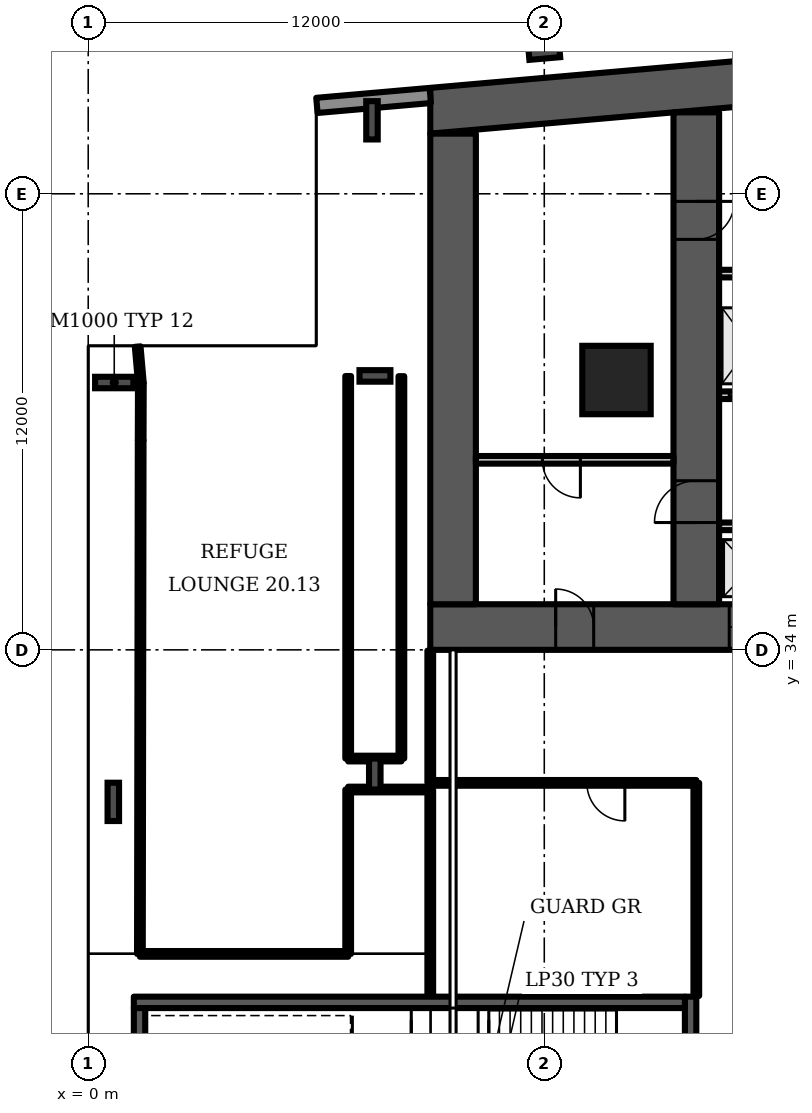
"""IFC4 building model, lengths in metres.
Left out: names, types, materials, properties, quantities, classifications, styles, units other than length and angle.
Written with IfcOpenShell. Run it as: python <this file> out.ifc"""

import sys

from ifc_helpers import new_model, si_unit, direction, frame, frame_2d, origin, origin_2d, place, context, subcontext, project, spatial, polyline, rectangle, i_section, outline, extrude, element, fill, save


model = new_model("IFC4")
c1 = context("Model", 3, precision=1e-05, world=origin(), true_north=direction((0.0, 1.0)))
c2 = subcontext(c1, "Body", "Model", "MODEL_VIEW")
j1 = project(units=[si_unit("LENGTHUNIT", "METRE"), si_unit("PLANEANGLEUNIT", "RADIAN")], contexts=[c1])
p1 = place(None, origin())
s1 = spatial("IfcSite", under=j1, at=p1, CompositionType="ELEMENT")
p2 = place(p1, origin())
s2 = spatial("IfcBuilding", under=s1, at=p2, CompositionType="ELEMENT")
p3 = place(p2, frame((0.0, 0.0, 91.9)))
s3 = spatial("IfcBuildingStorey", under=s2, at=p3, CompositionType="ELEMENT", Elevation=91.9)
p4 = place(p3, origin())
e1 = element("IfcWall", 1, at=p4, inside=s3, PredefinedType="SHEAR", context=c2, shape_type="SweptSolid", body=[
    extrude(outline(polyline([(9.0, 47.583), (37.0, 50.032), (65.0, 47.583), (65.0, 48.787), (37.0, 51.237), (9.0, 48.787), (9.0, 47.583)])), origin(), (0.0, 0.0, 1.0), 4.8),
])
p5 = place(p3, frame((9.0, 34.6, 0.0), z_axis=(0.0, 0.0, 1.0), x_axis=(1.0, 0.0, 0.0)))
e2 = element("IfcWall", 2, at=p5, inside=s3, PredefinedType="SHEAR", context=c2, shape_type="SweptSolid", body=[
    extrude(rectangle(XDim=56.0, YDim=1.2, at=frame_2d((28.0, 0.0))), origin(), (0.0, 0.0, 1.0), 4.8),
])
p6 = place(p5, frame((3.3, 0.0, 0.0)))
e3 = element("IfcOpeningElement", 3, at=p6, cuts=e2, PredefinedType="OPENING", context=c2, shape_type="SweptSolid", body=[
    extrude(rectangle(XDim=1.0, YDim=2.1, at=frame_2d((0.5, 1.05))), frame((0.0, 0.61, 0.0), z_axis=(0.0, -1.0, 0.0), x_axis=(1.0, 0.0, 0.0)), (0.0, 0.0, 1.0), 1.22),
])
p7 = place(p5, frame((7.867, 0.0, 0.0)))
e4 = element("IfcOpeningElement", 4, at=p7, cuts=e2, PredefinedType="OPENING", context=c2, shape_type="SweptSolid", body=[
    extrude(rectangle(XDim=1.1, YDim=2.1, at=frame_2d((0.55, 1.05))), frame((0.0, 0.61, 0.0), z_axis=(0.0, -1.0, 0.0), x_axis=(1.0, 0.0, 0.0)), (0.0, 0.0, 1.0), 1.22),
])
p8 = place(p5, frame((12.033, 0.0, 0.0)))
e5 = element("IfcOpeningElement", 5, at=p8, cuts=e2, PredefinedType="OPENING", context=c2, shape_type="SweptSolid", body=[
    extrude(rectangle(XDim=1.1, YDim=2.1, at=frame_2d((0.55, 1.05))), frame((0.0, 0.61, 0.0), z_axis=(0.0, -1.0, 0.0), x_axis=(1.0, 0.0, 0.0)), (0.0, 0.0, 1.0), 1.22),
])
p9 = place(p5, frame((9.8, 0.0, 0.0)))
e6 = element("IfcOpeningElement", 6, at=p9, cuts=e2, PredefinedType="OPENING", context=c2, shape_type="SweptSolid", body=[
    extrude(rectangle(XDim=1.4, YDim=2.1, at=frame_2d((0.7, 1.05))), frame((0.0, 0.61, 0.0), z_axis=(0.0, -1.0, 0.0), x_axis=(1.0, 0.0, 0.0)), (0.0, 0.0, 1.0), 1.22),
])
p10 = place(p5, frame((14.65, 0.0, 0.0)))
e7 = element("IfcOpeningElement", 7, at=p10, cuts=e2, PredefinedType="OPENING", context=c2, shape_type="SweptSolid", body=[
    extrude(rectangle(XDim=1.2, YDim=2.1, at=frame_2d((0.6, 1.05))), frame((0.0, 0.61, 0.0), z_axis=(0.0, -1.0, 0.0), x_axis=(1.0, 0.0, 0.0)), (0.0, 0.0, 1.0), 1.22),
])
p11 = place(p5, frame((21.867, 0.0, 0.0)))
e8 = element("IfcOpeningElement", 8, at=p11, cuts=e2, PredefinedType="OPENING", context=c2, shape_type="SweptSolid", body=[
    extrude(rectangle(XDim=1.1, YDim=2.1, at=frame_2d((0.55, 1.05))), frame((0.0, 0.61, 0.0), z_axis=(0.0, -1.0, 0.0), x_axis=(1.0, 0.0, 0.0)), (0.0, 0.0, 1.0), 1.22),
])
p12 = place(p5, frame((26.033, 0.0, 0.0)))
e9 = element("IfcOpeningElement", 9, at=p12, cuts=e2, PredefinedType="OPENING", context=c2, shape_type="SweptSolid", body=[
    extrude(rectangle(XDim=1.1, YDim=2.1, at=frame_2d((0.55, 1.05))), frame((0.0, 0.61, 0.0), z_axis=(0.0, -1.0, 0.0), x_axis=(1.0, 0.0, 0.0)), (0.0, 0.0, 1.0), 1.22),
])
p13 = place(p5, frame((23.8, 0.0, 0.0)))
e10 = element("IfcOpeningElement", 10, at=p13, cuts=e2, PredefinedType="OPENING", context=c2, shape_type="SweptSolid", body=[
    extrude(rectangle(XDim=1.4, YDim=2.1, at=frame_2d((0.7, 1.05))), frame((0.0, 0.61, 0.0), z_axis=(0.0, -1.0, 0.0), x_axis=(1.0, 0.0, 0.0)), (0.0, 0.0, 1.0), 1.22),
])
p14 = place(p5, frame((28.867, 0.0, 0.0)))
e11 = element("IfcOpeningElement", 11, at=p14, cuts=e2, PredefinedType="OPENING", context=c2, shape_type="SweptSolid", body=[
    extrude(rectangle(XDim=1.1, YDim=2.1, at=frame_2d((0.55, 1.05))), frame((0.0, 0.61, 0.0), z_axis=(0.0, -1.0, 0.0), x_axis=(1.0, 0.0, 0.0)), (0.0, 0.0, 1.0), 1.22),
])
p15 = place(p5, frame((33.033, 0.0, 0.0)))
e12 = element("IfcOpeningElement", 12, at=p15, cuts=e2, PredefinedType="OPENING", context=c2, shape_type="SweptSolid", body=[
    extrude(rectangle(XDim=1.1, YDim=2.1, at=frame_2d((0.55, 1.05))), frame((0.0, 0.61, 0.0), z_axis=(0.0, -1.0, 0.0), x_axis=(1.0, 0.0, 0.0)), (0.0, 0.0, 1.0), 1.22),
])
p16 = place(p5, frame((40.15, 0.0, 0.0)))
e13 = element("IfcOpeningElement", 13, at=p16, cuts=e2, PredefinedType="OPENING", context=c2, shape_type="SweptSolid", body=[
    extrude(rectangle(XDim=1.2, YDim=2.1, at=frame_2d((0.6, 1.05))), frame((0.0, 0.61, 0.0), z_axis=(0.0, -1.0, 0.0), x_axis=(1.0, 0.0, 0.0)), (0.0, 0.0, 1.0), 1.22),
])
p17 = place(p5, frame((44.8, 0.0, 0.0)))
e14 = element("IfcOpeningElement", 14, at=p17, cuts=e2, PredefinedType="OPENING", context=c2, shape_type="SweptSolid", body=[
    extrude(rectangle(XDim=1.4, YDim=2.1, at=frame_2d((0.7, 1.05))), frame((0.0, 0.61, 0.0), z_axis=(0.0, -1.0, 0.0), x_axis=(1.0, 0.0, 0.0)), (0.0, 0.0, 1.0), 1.22),
])
p18 = place(p5, frame((49.867, 0.0, 0.0)))
e15 = element("IfcOpeningElement", 15, at=p18, cuts=e2, PredefinedType="OPENING", context=c2, shape_type="SweptSolid", body=[
    extrude(rectangle(XDim=1.1, YDim=2.1, at=frame_2d((0.55, 1.05))), frame((0.0, 0.61, 0.0), z_axis=(0.0, -1.0, 0.0), x_axis=(1.0, 0.0, 0.0)), (0.0, 0.0, 1.0), 1.22),
])
p19 = place(p5, frame((53.5, 0.0, 0.0)))
e16 = element("IfcOpeningElement", 16, at=p19, cuts=e2, PredefinedType="OPENING", context=c2, shape_type="SweptSolid", body=[
    extrude(rectangle(XDim=1.1, YDim=2.1, at=frame_2d((0.55, 1.05))), frame((0.0, 0.61, 0.0), z_axis=(0.0, -1.0, 0.0), x_axis=(1.0, 0.0, 0.0)), (0.0, 0.0, 1.0), 1.22),
])
p20 = place(p5, frame((51.567, 0.0, 0.0)))
e17 = element("IfcOpeningElement", 17, at=p20, cuts=e2, PredefinedType="OPENING", context=c2, shape_type="SweptSolid", body=[
    extrude(rectangle(XDim=1.4, YDim=2.1, at=frame_2d((0.7, 1.05))), frame((0.0, 0.61, 0.0), z_axis=(0.0, -1.0, 0.0), x_axis=(1.0, 0.0, 0.0)), (0.0, 0.0, 1.0), 1.22),
])
p21 = place(p3, frame((9.6, 35.2, 0.0), z_axis=(0.0, 0.0, 1.0), x_axis=(0.0, 1.0, 0.0)))
e18 = element("IfcWall", 18, at=p21, inside=s3, PredefinedType="SHEAR", context=c2, shape_type="SweptSolid", body=[
    extrude(rectangle(XDim=12.383, YDim=1.2, at=frame_2d((6.191, 0.0))), origin(), (0.0, 0.0, 1.0), 4.8),
])
p22 = place(p3, frame((16.0, 35.2, 0.0), z_axis=(0.0, 0.0, 1.0), x_axis=(0.0, 1.0, 0.0)))
e19 = element("IfcWall", 19, at=p22, inside=s3, PredefinedType="SHEAR", context=c2, shape_type="SweptSolid", body=[
    extrude(rectangle(XDim=12.943, YDim=1.2, at=frame_2d((6.471, 0.0))), origin(), (0.0, 0.0, 1.0), 4.8),
])
p23 = place(p22, frame((2.15, 0.0, 0.0)))
e20 = element("IfcOpeningElement", 20, at=p23, cuts=e19, PredefinedType="OPENING", context=c2, shape_type="SweptSolid", body=[
    extrude(rectangle(XDim=1.1, YDim=2.1, at=frame_2d((0.55, 1.05))), frame((0.0, 0.61, 0.0), z_axis=(0.0, -1.0, 0.0), x_axis=(1.0, 0.0, 0.0)), (0.0, 0.0, 1.0), 1.22),
])
p24 = place(p22, frame((9.6, 0.0, 0.0)))
e21 = element("IfcOpeningElement", 21, at=p24, cuts=e19, PredefinedType="OPENING", context=c2, shape_type="SweptSolid", body=[
    extrude(rectangle(XDim=1.0, YDim=2.1, at=frame_2d((0.5, 1.05))), frame((0.0, 0.61, 0.0), z_axis=(0.0, -1.0, 0.0), x_axis=(1.0, 0.0, 0.0)), (0.0, 0.0, 1.0), 1.22),
])
p25 = place(p3, frame((13.9, 41.1, 0.0), z_axis=(0.0, 0.0, 1.0), x_axis=(1.0, 0.0, 0.0)))
e22 = element("IfcColumn", 22, at=p25, inside=s3, PredefinedType="COLUMN", context=c2, shape_type="SweptSolid", body=[
    extrude(rectangle(XDim=1.8, YDim=1.8, at=origin_2d()), origin(), (0.0, 0.0, 1.0), 4.8),
])
for number, where, z_axis, x_axis in (
    (23, (7.544, 41.208, 0.0), (0.0, 0.0, 1.0), (0.0, 1.0, 0.0)),
    (24, (7.54, 30.733, 0.0), (0.0, 0.0, 1.0), (-1.0, 0.0, 0.0)),
    (25, (12.0, 49.71, 0.0), (0.0, 0.0, 1.0), (-0.087, 0.996, 0.0)),
):
    element("IfcColumn", number, at=place(p3, frame(where, z_axis=z_axis, x_axis=x_axis)), inside=s3, PredefinedType="COLUMN", context=c2, shape_type="SweptSolid", body=[
        extrude(i_section(OverallWidth=0.303, OverallDepth=0.814, WebThickness=0.021, FlangeThickness=0.04, FilletRadius=0.03, at=origin_2d()), origin(), (0.0, 0.0, 1.0), 4.8),
    ])
for number, where, z_axis, x_axis in (
    (26, (7.467, 47.934, 0.0), (0.0, 0.0, 1.0), (-1.0, 0.0, 0.0)),
    (27, (0.685, 41.034, 0.0), (0.0, 0.0, 1.0), (0.0, 1.0, 0.0)),
    (28, (0.66, 30.0, 0.0), (0.0, 0.0, 1.0), (-1.0, 0.0, 0.0)),
):
    element("IfcColumn", number, at=place(p3, frame(where, z_axis=z_axis, x_axis=x_axis)), inside=s3, PredefinedType="COLUMN", context=c2, shape_type="SweptSolid", body=[
        extrude(i_section(OverallWidth=0.302, OverallDepth=1.008, WebThickness=0.021, FlangeThickness=0.04, FilletRadius=0.03, at=origin_2d()), origin(), (0.0, 0.0, 1.0), 4.8),
    ])
p26 = place(p3, frame((9.0, 48.587, 0.0), z_axis=(0.0, 0.0, 1.0), x_axis=(-0.996194, -0.087168, 0.0)))
e29 = element("IfcWall", 29, at=p26, inside=s3, PredefinedType="SOLIDWALL", context=c2, shape_type="SweptSolid", body=[
    extrude(rectangle(XDim=2.994, YDim=0.4, at=frame_2d((1.497, 0.0))), origin(), (0.0, 0.0, 1.0), 4.4),
])
p27 = place(p3, frame((10.2, 39.0, 0.0), z_axis=(0.0, 0.0, 1.0), x_axis=(1.0, 0.0, 0.0)))
e30 = element("IfcWall", 30, at=p27, inside=s3, PredefinedType="PARTITIONING", context=c2, shape_type="SweptSolid", body=[
    extrude(rectangle(XDim=5.2, YDim=0.2, at=frame_2d((2.6, 0.0))), origin(), (0.0, 0.0, 1.0), 4.4),
])
p28 = place(p27, frame((1.75, 0.0, 0.0)))
e31 = element("IfcOpeningElement", 31, at=p28, cuts=e30, PredefinedType="OPENING", context=c2, shape_type="SweptSolid", body=[
    extrude(rectangle(XDim=1.0, YDim=2.1, at=frame_2d((0.5, 1.05))), frame((0.0, 0.11, 0.0), z_axis=(0.0, -1.0, 0.0), x_axis=(1.0, 0.0, 0.0)), (0.0, 0.0, 1.0), 0.22),
])
p29 = place(p3, frame((16.6, 40.7, 0.0), z_axis=(0.0, 0.0, 1.0), x_axis=(1.0, 0.0, 0.0)))
e32 = element("IfcWall", 32, at=p29, inside=s3, PredefinedType="PARTITIONING", context=c2, shape_type="SweptSolid", body=[
    extrude(rectangle(XDim=5.8, YDim=0.2, at=frame_2d((2.9, 0.0))), origin(), (0.0, 0.0, 1.0), 4.4),
])
p30 = place(p29, frame((0.267, 0.0, 0.0)))
e33 = element("IfcOpeningElement", 33, at=p30, cuts=e32, PredefinedType="OPENING", context=c2, shape_type="SweptSolid", body=[
    extrude(rectangle(XDim=1.1, YDim=2.1, at=frame_2d((0.55, 1.05))), frame((0.0, 0.11, 0.0), z_axis=(0.0, -1.0, 0.0), x_axis=(1.0, 0.0, 0.0)), (0.0, 0.0, 1.0), 0.22),
])
p31 = place(p29, frame((2.35, 0.0, 0.0)))
e34 = element("IfcOpeningElement", 34, at=p31, cuts=e32, PredefinedType="OPENING", context=c2, shape_type="SweptSolid", body=[
    extrude(rectangle(XDim=1.1, YDim=2.1, at=frame_2d((0.55, 1.05))), frame((0.0, 0.11, 0.0), z_axis=(0.0, -1.0, 0.0), x_axis=(1.0, 0.0, 0.0)), (0.0, 0.0, 1.0), 0.22),
])
p32 = place(p29, frame((4.433, 0.0, 0.0)))
e35 = element("IfcOpeningElement", 35, at=p32, cuts=e32, PredefinedType="OPENING", context=c2, shape_type="SweptSolid", body=[
    extrude(rectangle(XDim=1.1, YDim=2.1, at=frame_2d((0.55, 1.05))), frame((0.0, 0.11, 0.0), z_axis=(0.0, -1.0, 0.0), x_axis=(1.0, 0.0, 0.0)), (0.0, 0.0, 1.0), 0.22),
])
p33 = place(p3, origin())
e36 = element("IfcWall", 36, at=p33, inside=s3, PredefinedType="PARTITIONING", context=c2, shape_type="SweptSolid", body=[
    extrude(outline(polyline([(18.233, 37.15), (16.6, 37.15), (16.6, 37.35), (18.233, 37.35), (18.433, 37.35), (18.433, 35.2), (18.233, 35.2), (18.233, 37.15)])), origin(), (0.0, 0.0, 1.0), 4.4),
])
p34 = place(p3, origin())
e37 = element("IfcWall", 37, at=p34, inside=s3, PredefinedType="PARTITIONING", context=c2, shape_type="SweptSolid", body=[
    extrude(outline(polyline([(18.433, 40.8), (18.233, 40.8), (18.233, 43.8), (16.6, 43.8), (16.6, 44.0), (22.4, 44.0), (22.4, 43.8), (20.767, 43.8), (20.767, 40.8), (20.567, 40.8), (20.567, 43.8), (18.433, 43.8), (18.433, 40.8)])), origin(), (0.0, 0.0, 1.0), 4.4),
])
p35 = place(p3, frame((15.85, 20.325, 0.0), z_axis=(0.0, 0.0, 1.0), x_axis=(0.0, 1.0, 0.0)))
e38 = element("IfcWall", 38, at=p35, inside=s3, PredefinedType="SHEAR", context=c2, shape_type="SweptSolid", body=[
    extrude(rectangle(XDim=4.55, YDim=0.3, at=frame_2d((2.275, 0.0))), origin(), (0.0, 0.0, 1.0), 4.4),
])
p36 = place(p35, frame((1.775, 0.0, 0.0)))
e39 = element("IfcOpeningElement", 39, at=p36, cuts=e38, PredefinedType="OPENING", context=c2, shape_type="SweptSolid", body=[
    extrude(rectangle(XDim=1.2, YDim=2.1, at=frame_2d((0.6, 1.05))), frame((0.0, 0.16, 0.0), z_axis=(0.0, -1.0, 0.0), x_axis=(1.0, 0.0, 0.0)), (0.0, 0.0, 1.0), 0.32),
])
p37 = place(p3, frame((1.36, 26.0, 0.0), z_axis=(0.0, 0.0, 1.0), x_axis=(0.001463, 0.999995, 0.0)))
e40 = element("IfcWall", 40, at=p37, inside=s3, PredefinedType="PARTITIONING", context=c2, shape_type="SweptSolid", body=[
    extrude(rectangle(XDim=13.515, YDim=0.15, at=frame_2d((6.757, 0.0))), origin(), (0.0, 0.0, 1.0), 4.4),
])
p38 = place(p3, frame((1.36, 26.0, 0.0), z_axis=(0.0, 0.0, 1.0), x_axis=(1.0, 0.0, 0.0)))
e41 = element("IfcWall", 41, at=p38, inside=s3, PredefinedType="PARTITIONING", context=c2, shape_type="SweptSolid", body=[
    extrude(rectangle(XDim=5.48, YDim=0.15, at=frame_2d((2.74, 0.0))), origin(), (0.0, 0.0, 1.0), 4.4),
])
p39 = place(p3, frame((1.38, 39.515, 0.0), z_axis=(0.0, 0.0, 1.0), x_axis=(0.003406, 0.99999, 0.0)))
e42 = element("IfcWall", 42, at=p39, inside=s3, PredefinedType="PARTITIONING", context=c2, shape_type="SweptSolid", body=[
    extrude(rectangle(XDim=1.505, YDim=0.15, at=frame_2d((0.752, 0.0))), origin(), (0.0, 0.0, 1.0), 4.4),
])
p40 = place(p3, frame((1.385, 41.02, 0.0), z_axis=(0.0, 0.0, 1.0), x_axis=(-0.0864, 0.99626, 0.0)))
e43 = element("IfcWall", 43, at=p40, inside=s3, PredefinedType="PARTITIONING", context=c2, shape_type="SweptSolid", body=[
    extrude(rectangle(XDim=0.964, YDim=0.15, at=frame_2d((0.482, 0.0))), origin(), (0.0, 0.0, 1.0), 4.4),
])
p41 = place(p3, frame((6.84, 26.0, 0.0), z_axis=(0.0, 0.0, 1.0), x_axis=(0.0, 1.0, 0.0)))
e44 = element("IfcWall", 44, at=p41, inside=s3, PredefinedType="PARTITIONING", context=c2, shape_type="SweptSolid", body=[
    extrude(rectangle(XDim=4.325, YDim=0.15, at=frame_2d((2.163, 0.0))), origin(), (0.0, 0.0, 1.0), 4.4),
])
p42 = place(p3, frame((6.84, 30.325, 0.0), z_axis=(0.0, 0.0, 1.0), x_axis=(1.0, 0.0, 0.0)))
e45 = element("IfcWall", 45, at=p42, inside=s3, PredefinedType="PARTITIONING", context=c2, shape_type="SweptSolid", body=[
    extrude(rectangle(XDim=2.16, YDim=0.15, at=frame_2d((1.08, 0.0))), origin(), (0.0, 0.0, 1.0), 4.4),
])
p43 = place(p3, frame((6.84, 31.14, 0.0), z_axis=(0.0, 0.0, 1.0), x_axis=(0.0, 1.0, 0.0)))
e46 = element("IfcWall", 46, at=p43, inside=s3, PredefinedType="PARTITIONING", context=c2, shape_type="SweptSolid", body=[
    extrude(rectangle(XDim=10.065, YDim=0.15, at=frame_2d((5.032, 0.0))), origin(), (0.0, 0.0, 1.0), 4.4),
])
p44 = place(p3, frame((6.84, 31.14, 0.0), z_axis=(0.0, 0.0, 1.0), x_axis=(1.0, 0.0, 0.0)))
e47 = element("IfcWall", 47, at=p44, inside=s3, PredefinedType="PARTITIONING", context=c2, shape_type="SweptSolid", body=[
    extrude(rectangle(XDim=1.4, YDim=0.15, at=frame_2d((0.7, 0.0))), origin(), (0.0, 0.0, 1.0), 4.4),
])
p45 = place(p3, frame((8.24, 31.14, 0.0), z_axis=(0.0, 0.0, 1.0), x_axis=(0.0, 1.0, 0.0)))
e48 = element("IfcWall", 48, at=p45, inside=s3, PredefinedType="PARTITIONING", context=c2, shape_type="SweptSolid", body=[
    extrude(rectangle(XDim=10.061, YDim=0.15, at=frame_2d((5.03, 0.0))), origin(), (0.0, 0.0, 1.0), 4.4),
])
p46 = place(p3, frame((9.0, 24.895, 0.0), z_axis=(0.0, 0.0, 1.0), x_axis=(0.0, 1.0, 0.0)))
e49 = element("IfcWall", 49, at=p46, inside=s3, PredefinedType="PARTITIONING", context=c2, shape_type="SweptSolid", body=[
    extrude(rectangle(XDim=5.43, YDim=0.15, at=frame_2d((2.715, 0.0))), origin(), (0.0, 0.0, 1.0), 4.4),
])
p47 = place(p3, frame((9.0, 30.5, 0.0), z_axis=(0.0, 0.0, 1.0), x_axis=(0.0, 1.0, 0.0)))
e50 = element("IfcWall", 50, at=p47, inside=s3, PredefinedType="PARTITIONING", context=c2, shape_type="SweptSolid", body=[
    extrude(rectangle(XDim=3.48, YDim=0.15, at=frame_2d((1.74, 0.0))), origin(), (0.0, 0.0, 1.0), 4.4),
])
p48 = place(p3, frame((9.0, 30.5, 0.0), z_axis=(0.0, 0.0, 1.0), x_axis=(1.0, 0.0, 0.0)))
e51 = element("IfcWall", 51, at=p48, inside=s3, PredefinedType="PARTITIONING", context=c2, shape_type="SweptSolid", body=[
    extrude(rectangle(XDim=7.0, YDim=0.15, at=frame_2d((3.5, 0.0))), origin(), (0.0, 0.0, 1.0), 4.4),
])
p49 = place(p48, frame((4.12, 0.0, 0.0)))
e52 = element("IfcOpeningElement", 52, at=p49, cuts=e51, PredefinedType="OPENING", context=c2, shape_type="SweptSolid", body=[
    extrude(rectangle(XDim=1.0, YDim=2.1, at=frame_2d((0.5, 1.05))), frame((0.0, 0.085, 0.0), z_axis=(0.0, -1.0, 0.0), x_axis=(1.0, 0.0, 0.0)), (0.0, 0.0, 1.0), 0.17),
])
p50 = place(p3, frame((16.0, 24.895, 0.0), z_axis=(0.0, 0.0, 1.0), x_axis=(0.0, 1.0, 0.0)))
e53 = element("IfcWall", 53, at=p50, inside=s3, PredefinedType="PARTITIONING", context=c2, shape_type="SweptSolid", body=[
    extrude(rectangle(XDim=5.605, YDim=0.15, at=frame_2d((2.802, 0.0))), origin(), (0.0, 0.0, 1.0), 4.4),
])
p51 = place(p3, frame((1.2, 24.725, 0.0), z_axis=(0.0, 0.0, 1.0), x_axis=(1.0, 0.0, 0.0)))
e54 = element("IfcWall", 54, at=p51, inside=s3, PredefinedType="SHEAR", context=c2, shape_type="SweptSolid", body=[
    extrude(rectangle(XDim=14.5, YDim=0.3, at=frame_2d((7.25, 0.0))), origin(), (0.0, 0.0, 1.0), 4.4),
])
p52 = place(p3, frame((1.35, 20.625, 0.0), z_axis=(0.0, 0.0, 1.0), x_axis=(0.0, 1.0, 0.0)))
e55 = element("IfcWall", 55, at=p52, inside=s3, PredefinedType="SHEAR", context=c2, shape_type="SweptSolid", body=[
    extrude(rectangle(XDim=3.95, YDim=0.3, at=frame_2d((1.975, 0.0))), origin(), (0.0, 0.0, 1.0), 4.4),
])
p53 = place(p6, origin())
e56 = element("IfcDoor", 56, at=p53, inside=s3, OperationType="SINGLE_SWING_LEFT", PredefinedType="DOOR", context=c2, shape_type="SweptSolid", body=[
    extrude(rectangle(XDim=1.0, YDim=2.1, at=frame_2d((0.5, 1.05))), frame((0.0, 0.6, 0.0), z_axis=(0.0, -1.0, 0.0), x_axis=(1.0, 0.0, 0.0)), (0.0, 0.0, 1.0), 1.199),
])
fill(e3, e56)
p54 = place(p28, origin())
e57 = element("IfcDoor", 57, at=p54, inside=s3, OperationType="SINGLE_SWING_RIGHT", PredefinedType="DOOR", context=c2, shape_type="SweptSolid", body=[
    extrude(rectangle(XDim=1.0, YDim=2.1, at=frame_2d((0.5, 1.05))), frame((0.0, 0.025, 0.0), z_axis=(0.0, -1.0, 0.0), x_axis=(1.0, 0.0, 0.0)), (0.0, 0.0, 1.0), 0.05),
])
fill(e31, e57)
p55 = place(p7, origin())
e58 = element("IfcDoor", 58, at=p55, inside=s3, OperationType="DOUBLE_DOOR_SLIDING", PredefinedType="DOOR", context=c2, shape_type="SweptSolid", body=[
    extrude(rectangle(XDim=1.1, YDim=2.1, at=frame_2d((0.55, 1.05))), frame((0.0, 0.025, 0.0), z_axis=(0.0, -1.0, 0.0), x_axis=(1.0, 0.0, 0.0)), (0.0, 0.0, 1.0), 0.05),
])
fill(e4, e58)
p56 = place(p30, origin())
e59 = element("IfcDoor", 59, at=p56, inside=s3, OperationType="DOUBLE_DOOR_SLIDING", PredefinedType="DOOR", context=c2, shape_type="SweptSolid", body=[
    extrude(rectangle(XDim=1.1, YDim=2.1, at=frame_2d((0.55, 1.05))), frame((0.0, 0.025, 0.0), z_axis=(0.0, -1.0, 0.0), x_axis=(1.0, 0.0, 0.0)), (0.0, 0.0, 1.0), 0.05),
])
fill(e33, e59)
p57 = place(p23, origin())
e60 = element("IfcDoor", 60, at=p57, inside=s3, OperationType="SINGLE_SWING_LEFT", PredefinedType="DOOR", context=c2, shape_type="SweptSolid", body=[
    extrude(rectangle(XDim=1.1, YDim=2.1, at=frame_2d((0.55, 1.05))), frame((0.0, 0.025, 0.0), z_axis=(0.0, -1.0, 0.0), x_axis=(1.0, 0.0, 0.0)), (0.0, 0.0, 1.0), 0.05),
])
fill(e20, e60)
p58 = place(p24, origin())
e61 = element("IfcDoor", 61, at=p58, inside=s3, OperationType="SINGLE_SWING_RIGHT", PredefinedType="DOOR", context=c2, shape_type="SweptSolid", body=[
    extrude(rectangle(XDim=1.0, YDim=2.1, at=frame_2d((0.5, 1.05))), frame((0.0, 0.6, 0.0), z_axis=(0.0, -1.0, 0.0), x_axis=(1.0, 0.0, 0.0)), (0.0, 0.0, 1.0), 1.199),
])
fill(e21, e61)
p59 = place(p49, origin())
e62 = element("IfcDoor", 62, at=p59, inside=s3, OperationType="SINGLE_SWING_RIGHT", PredefinedType="DOOR", context=c2, shape_type="SweptSolid", body=[
    extrude(rectangle(XDim=1.0, YDim=2.1, at=frame_2d((0.5, 1.05))), frame((0.0, 0.025, 0.0), z_axis=(0.0, -1.0, 0.0), x_axis=(1.0, 0.0, 0.0)), (0.0, 0.0, 1.0), 0.05),
])
fill(e52, e62)
save(model, sys.argv[1])
